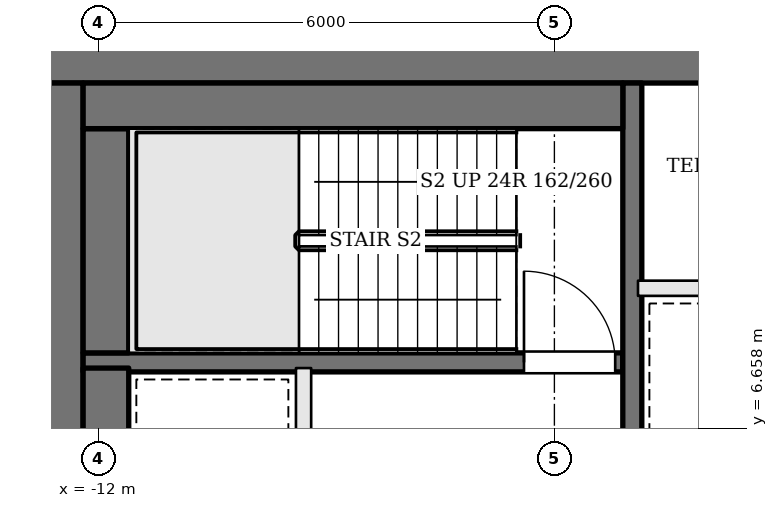
"""IFC4 building model, lengths in metres.
Left out: names, types, materials, properties, quantities, classifications, styles, units other than length and angle.
Written with IfcOpenShell. Run it as: python <this file> out.ifc"""

import sys

from ifc_helpers import new_model, si_unit, direction, frame, frame_2d, origin, place, context, subcontext, project, spatial, rectangle, extrude, element, fill, save


model = new_model("IFC4")
c1 = context("Model", 3, precision=1e-05, world=origin(), true_north=direction((0.0, 1.0)))
c2 = subcontext(c1, "Body", "Model", "MODEL_VIEW")
j1 = project(units=[si_unit("LENGTHUNIT", "METRE"), si_unit("PLANEANGLEUNIT", "RADIAN")], contexts=[c1])
p1 = place(None, origin())
s1 = spatial("IfcSite", under=j1, at=p1, CompositionType="ELEMENT")
p2 = place(p1, origin())
s2 = spatial("IfcBuilding", under=s1, at=p2, CompositionType="ELEMENT")
p3 = place(p2, frame((0.0, 0.0, 303.9)))
s3 = spatial("IfcBuildingStorey", under=s2, at=p3, CompositionType="ELEMENT", Elevation=303.9)
p4 = place(p3, frame((-13.0, 11.6, 0.0), z_axis=(0.0, 0.0, 1.0), x_axis=(1.0, 0.0, 0.0)))
e1 = element("IfcWall", 1, at=p4, inside=s3, PredefinedType="SHEAR", context=c2, shape_type="SweptSolid", body=[
    extrude(rectangle(XDim=26.0, YDim=0.8, at=frame_2d((13.0, 0.0))), origin(), (0.0, 0.0, 1.0), 3.9),
])
p5 = place(p4, frame((9.375, 0.0, 0.0)))
e2 = element("IfcOpeningElement", 2, at=p5, cuts=e1, PredefinedType="OPENING", context=c2, shape_type="SweptSolid", body=[
    extrude(rectangle(XDim=0.7, YDim=2.1, at=frame_2d((0.35, 1.05))), frame((0.0, 0.41, 0.0), z_axis=(0.0, -1.0, 0.0), x_axis=(1.0, 0.0, 0.0)), (0.0, 0.0, 1.0), 0.82),
])
p6 = place(p4, frame((12.075, 0.0, 0.0)))
e3 = element("IfcOpeningElement", 3, at=p6, cuts=e1, PredefinedType="OPENING", context=c2, shape_type="SweptSolid", body=[
    extrude(rectangle(XDim=1.0, YDim=2.1, at=frame_2d((0.5, 1.05))), frame((0.0, 0.41, 0.0), z_axis=(0.0, -1.0, 0.0), x_axis=(1.0, 0.0, 0.0)), (0.0, 0.0, 1.0), 0.82),
])
p7 = place(p4, frame((14.675, 0.0, 0.0)))
e4 = element("IfcOpeningElement", 4, at=p7, cuts=e1, PredefinedType="OPENING", context=c2, shape_type="SweptSolid", body=[
    extrude(rectangle(XDim=0.7, YDim=2.1, at=frame_2d((0.35, 1.05))), frame((0.0, 0.41, 0.0), z_axis=(0.0, -1.0, 0.0), x_axis=(1.0, 0.0, 0.0)), (0.0, 0.0, 1.0), 0.82),
])
p8 = place(p4, frame((16.625, 0.0, 0.0)))
e5 = element("IfcOpeningElement", 5, at=p8, cuts=e1, PredefinedType="OPENING", context=c2, shape_type="SweptSolid", body=[
    extrude(rectangle(XDim=0.9, YDim=2.1, at=frame_2d((0.45, 1.05))), frame((0.0, 0.41, 0.0), z_axis=(0.0, -1.0, 0.0), x_axis=(1.0, 0.0, 0.0)), (0.0, 0.0, 1.0), 0.82),
])
p9 = place(p3, frame((-12.6, -2.2, 0.0), z_axis=(0.0, 0.0, 1.0), x_axis=(0.0, 1.0, 0.0)))
e6 = element("IfcWall", 6, at=p9, inside=s3, PredefinedType="SHEAR", context=c2, shape_type="SweptSolid", body=[
    extrude(rectangle(XDim=13.4, YDim=0.8, at=frame_2d((6.7, 0.0))), origin(), (0.0, 0.0, 1.0), 3.9),
])
p10 = place(p9, frame((4.2, 0.0, 0.0)))
e7 = element("IfcOpeningElement", 7, at=p10, cuts=e6, PredefinedType="OPENING", context=c2, shape_type="SweptSolid", body=[
    extrude(rectangle(XDim=1.8, YDim=2.1, at=frame_2d((0.9, 1.05))), frame((0.0, 0.41, 0.0), z_axis=(0.0, -1.0, 0.0), x_axis=(1.0, 0.0, 0.0)), (0.0, 0.0, 1.0), 0.82),
])
p11 = place(p3, frame((-12.2, 7.525, 0.0), z_axis=(0.0, 0.0, 1.0), x_axis=(1.0, 0.0, 0.0)))
e8 = element("IfcWall", 8, at=p11, inside=s3, PredefinedType="SOLIDWALL", context=c2, shape_type="SweptSolid", body=[
    extrude(rectangle(XDim=7.1, YDim=0.25, at=frame_2d((3.55, 0.0))), origin(), (0.0, 0.0, 1.0), 3.7),
])
p12 = place(p11, frame((5.8, 0.0, 0.0)))
e9 = element("IfcOpeningElement", 9, at=p12, cuts=e8, PredefinedType="OPENING", context=c2, shape_type="SweptSolid", body=[
    extrude(rectangle(XDim=1.2, YDim=2.1, at=frame_2d((0.6, 1.05))), frame((0.0, 0.135, 0.0), z_axis=(0.0, -1.0, 0.0), x_axis=(1.0, 0.0, 0.0)), (0.0, 0.0, 1.0), 0.27),
])
p13 = place(p3, frame((-9.3, 4.45, 0.0), z_axis=(0.0, 0.0, 1.0), x_axis=(0.0, 1.0, 0.0)))
e10 = element("IfcWall", 10, at=p13, inside=s3, PredefinedType="SOLIDWALL", context=c2, shape_type="SweptSolid", body=[
    extrude(rectangle(XDim=3.0, YDim=0.2, at=frame_2d((1.5, 0.0))), origin(), (0.0, 0.0, 1.0), 3.7),
])
p14 = place(p3, frame((-4.975, -2.2, 0.0), z_axis=(0.0, 0.0, 1.0), x_axis=(0.0, 1.0, 0.0)))
e11 = element("IfcWall", 11, at=p14, inside=s3, PredefinedType="SOLIDWALL", context=c2, shape_type="SweptSolid", body=[
    extrude(rectangle(XDim=13.4, YDim=0.25, at=frame_2d((6.7, 0.0))), origin(), (0.0, 0.0, 1.0), 3.7),
])
p15 = place(p14, frame((5.25, 0.0, 0.0)))
e12 = element("IfcOpeningElement", 12, at=p15, cuts=e11, PredefinedType="OPENING", context=c2, shape_type="SweptSolid", body=[
    extrude(rectangle(XDim=1.2, YDim=2.1, at=frame_2d((0.6, 1.05))), frame((0.0, 0.135, 0.0), z_axis=(0.0, -1.0, 0.0), x_axis=(1.0, 0.0, 0.0)), (0.0, 0.0, 1.0), 0.27),
])
p16 = place(p3, frame((-11.9, 4.45, 0.0), z_axis=(0.0, 0.0, 1.0), x_axis=(0.0, 1.0, 0.0)))
e13 = element("IfcWall", 13, at=p16, inside=s3, PredefinedType="SOLIDWALL", context=c2, shape_type="SweptSolid", body=[
    extrude(rectangle(XDim=3.0, YDim=0.6, at=frame_2d((1.5, 0.0))), origin(), (0.0, 0.0, 1.0), 3.7),
])
p17 = place(p3, frame((-11.9, 7.65, 0.0), z_axis=(0.0, 0.0, 1.0), x_axis=(0.0, 1.0, 0.0)))
e14 = element("IfcWall", 14, at=p17, inside=s3, PredefinedType="SOLIDWALL", context=c2, shape_type="SweptSolid", body=[
    extrude(rectangle(XDim=2.95, YDim=0.6, at=frame_2d((1.475, 0.0))), origin(), (0.0, 0.0, 1.0), 3.7),
])
p18 = place(p3, frame((-12.2, 10.9, 0.0), z_axis=(0.0, 0.0, 1.0), x_axis=(1.0, 0.0, 0.0)))
e15 = element("IfcWall", 15, at=p18, inside=s3, PredefinedType="SOLIDWALL", context=c2, shape_type="SweptSolid", body=[
    extrude(rectangle(XDim=7.1, YDim=0.6, at=frame_2d((3.55, 0.0))), origin(), (0.0, 0.0, 1.0), 3.7),
])
p19 = place(p3, frame((-4.9, 8.5, 0.0), z_axis=(0.0, 0.0, 1.0), x_axis=(1.0, 0.0, 0.0)))
e16 = element("IfcWall", 16, at=p19, inside=s3, PredefinedType="SOLIDWALL", context=c2, shape_type="SweptSolid", body=[
    extrude(rectangle(XDim=9.8, YDim=0.2, at=frame_2d((4.9, 0.0))), origin(), (0.0, 0.0, 1.0), 3.7),
])
p20 = place(p12, origin())
e17 = element("IfcDoor", 17, at=p20, inside=s3, OperationType="SINGLE_SWING_LEFT", PredefinedType="DOOR", context=c2, shape_type="SweptSolid", body=[
    extrude(rectangle(XDim=1.2, YDim=2.1, at=frame_2d((0.6, 1.05))), frame((0.0, 0.025, 0.0), z_axis=(0.0, -1.0, 0.0), x_axis=(1.0, 0.0, 0.0)), (0.0, 0.0, 1.0), 0.05),
])
fill(e9, e17)
save(model, sys.argv[1])
